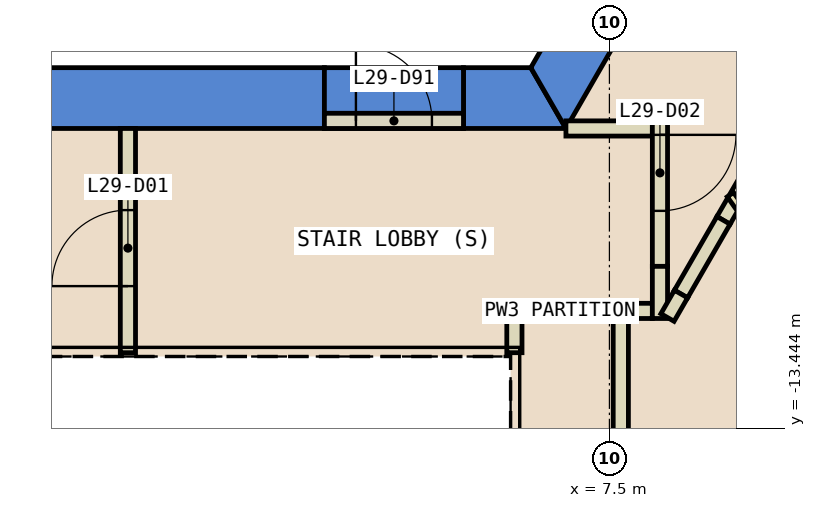
"""IFC4 building model, lengths in metres.
Left out: names, types, materials, properties, quantities, classifications, styles, units other than length and angle.
Written with IfcOpenShell. Run it as: python <this file> out.ifc"""

import sys

from ifc_helpers import new_model, si_unit, direction, frame, frame_2d, origin, place, context, subcontext, project, spatial, polyline, rectangle, outline, extrude, element, fill, save


model = new_model("IFC4")
c1 = context("Model", 3, precision=1e-05, world=origin(), true_north=direction((0.0, 1.0)))
c2 = subcontext(c1, "Body", "Model", "MODEL_VIEW")
j1 = project(units=[si_unit("LENGTHUNIT", "METRE"), si_unit("PLANEANGLEUNIT", "RADIAN")], contexts=[c1])
p1 = place(None, origin())
s1 = spatial("IfcSite", under=j1, at=p1, CompositionType="ELEMENT")
p2 = place(p1, origin())
s2 = spatial("IfcBuilding", under=s1, at=p2, CompositionType="ELEMENT")
p3 = place(p2, frame((0.0, 0.0, 132.8)))
s3 = spatial("IfcBuildingStorey", under=s2, at=p3, CompositionType="ELEMENT", Elevation=132.8)
p4 = place(p3, frame((0.0, 0.0, -0.6)))
e1 = element("IfcWall", 1, at=p4, inside=s3, PredefinedType="SHEAR", context=c2, shape_type="SweptSolid", body=[
    extrude(outline(polyline([(3.75, -9.5), (3.75, -8.7), (-6.466, -8.7), (-6.928, -9.5), (3.75, -9.5)])), origin(), (0.0, 0.0, 1.0), 5.4),
])
p5 = place(p3, frame((0.0, 0.0, -0.6)))
e2 = element("IfcWall", 2, at=p5, inside=s3, PredefinedType="SHEAR", context=c2, shape_type="SweptSolid", body=[
    extrude(outline(polyline([(5.58, -8.7), (5.58, -9.5), (6.928, -9.5), (6.466, -8.7), (5.58, -8.7)])), origin(), (0.0, 0.0, 1.0), 5.4),
])
p6 = place(p3, frame((0.0, 0.0, 3.6)))
e3 = element("IfcWall", 3, at=p6, inside=s3, PredefinedType="SHEAR", context=c2, shape_type="SweptSolid", body=[
    extrude(outline(polyline([(5.58, -9.5), (5.58, -8.7), (3.75, -8.7), (3.75, -9.5), (5.58, -9.5)])), origin(), (0.0, 0.0, 1.0), 1.2),
])
p7 = place(p3, frame((0.0, 0.0, -0.6)))
e4 = element("IfcWall", 4, at=p7, inside=s3, PredefinedType="SHEAR", context=c2, shape_type="SweptSolid", body=[
    extrude(outline(polyline([(8.117, -7.44), (7.424, -7.04), (6.466, -8.7), (6.928, -9.5), (8.117, -7.44)])), origin(), (0.0, 0.0, 1.0), 5.4),
])
p8 = place(p3, frame((9.31, -5.375, 0.0), z_axis=(0.0, 0.0, 1.0), x_axis=(0.86602173752, -0.500006350103, 0.0)))
e5 = element("IfcWall", 5, at=p8, inside=s3, PredefinedType="SHEAR", context=c2, shape_type="SweptSolid", body=[
    extrude(rectangle(XDim=31.463, YDim=1.0, at=frame_2d((15.732, 0.0))), origin(), (0.0, 0.0, 1.0), 4.8),
])
p9 = place(p3, frame((1.165, -12.45, 0.0), z_axis=(0.0, 0.0, 1.0), x_axis=(0.0, 1.0, 0.0)))
e6 = element("IfcWall", 6, at=p9, inside=s3, PredefinedType="PARTITIONING", context=c2, shape_type="SweptSolid", body=[
    extrude(rectangle(XDim=2.95, YDim=0.2, at=frame_2d((1.475, 0.0))), origin(), (0.0, 0.0, 1.0), 4.8),
])
p10 = place(p9, frame((0.876, 0.0, 0.0)))
e7 = element("IfcOpeningElement", 7, at=p10, cuts=e6, PredefinedType="OPENING", context=c2, shape_type="SweptSolid", body=[
    extrude(rectangle(XDim=1.0, YDim=2.1, at=frame_2d((0.5, 1.05))), frame((0.0, 0.11, 0.0), z_axis=(0.0, -1.0, 0.0), x_axis=(1.0, 0.0, 0.0)), (0.0, 0.0, 1.0), 0.22),
])
p11 = place(p3, frame((7.55, -11.9, 0.0), z_axis=(0.0, 0.0, 1.0), x_axis=(-1.0, 0.0, 0.0)))
e8 = element("IfcWall", 8, at=p11, inside=s3, PredefinedType="PARTITIONING", context=c2, shape_type="SweptSolid", body=[
    extrude(rectangle(XDim=1.399, YDim=0.2, at=frame_2d((0.7, 0.0))), origin(), (0.0, 0.0, 1.0), 4.8),
])
p12 = place(p3, frame((6.25, -12.0, 0.0), z_axis=(0.0, 0.0, 1.0), x_axis=(0.0, -1.0, 0.0)))
e9 = element("IfcWall", 9, at=p12, inside=s3, PredefinedType="PARTITIONING", context=c2, shape_type="SweptSolid", body=[
    extrude(rectangle(XDim=0.45, YDim=0.2, at=frame_2d((0.225, 0.0))), origin(), (0.0, 0.0, 1.0), 4.8),
])
p13 = place(p3, frame((6.928, -9.5, 0.0), z_axis=(0.0, 0.0, 1.0), x_axis=(1.0, 0.0, 0.0)))
e10 = element("IfcWall", 10, at=p13, inside=s3, PredefinedType="PARTITIONING", context=c2, shape_type="SweptSolid", body=[
    extrude(rectangle(XDim=1.137, YDim=0.2, at=frame_2d((0.568, 0.0))), origin(), (0.0, 0.0, 1.0), 2.4),
])
p14 = place(p3, frame((8.165, -9.4, 0.0), z_axis=(0.0, 0.0, 1.0), x_axis=(0.0, -1.0, 0.0)))
e11 = element("IfcWall", 11, at=p14, inside=s3, PredefinedType="PARTITIONING", context=c2, shape_type="SweptSolid", body=[
    extrude(rectangle(XDim=1.914, YDim=0.2, at=frame_2d((0.957, 0.0))), origin(), (0.0, 0.0, 1.0), 2.4),
])
p15 = place(p14, frame((0.184, 0.0, 0.0)))
e12 = element("IfcOpeningElement", 12, at=p15, cuts=e11, PredefinedType="OPENING", context=c2, shape_type="SweptSolid", body=[
    extrude(rectangle(XDim=1.0, YDim=2.1, at=frame_2d((0.5, 1.05))), frame((0.0, 0.11, 0.0), z_axis=(0.0, -1.0, 0.0), x_axis=(1.0, 0.0, 0.0)), (0.0, 0.0, 1.0), 0.22),
])
p16 = place(p3, frame((8.065, -11.9, 0.0), z_axis=(0.0, 0.0, 1.0), x_axis=(-1.0, 0.0, 0.0)))
e13 = element("IfcWall", 13, at=p16, inside=s3, PredefinedType="PARTITIONING", context=c2, shape_type="SweptSolid", body=[
    extrude(rectangle(XDim=0.315, YDim=0.2, at=frame_2d((0.157, 0.0))), origin(), (0.0, 0.0, 1.0), 4.8),
])
p17 = place(p3, frame((7.65, -11.8, 0.0), z_axis=(0.0, 0.0, 1.0), x_axis=(0.0, -1.0, 0.0)))
e14 = element("IfcWall", 14, at=p17, inside=s3, PredefinedType="PARTITIONING", context=c2, shape_type="SweptSolid", body=[
    extrude(rectangle(XDim=9.006, YDim=0.2, at=frame_2d((4.503, 0.0))), origin(), (0.0, 0.0, 1.0), 4.8),
])
p18 = place(p17, frame((7.864, 0.0, 0.0)))
e15 = element("IfcOpeningElement", 15, at=p18, cuts=e14, PredefinedType="OPENING", context=c2, shape_type="SweptSolid", body=[
    extrude(rectangle(XDim=1.0, YDim=2.1, at=frame_2d((0.5, 1.05))), frame((0.0, 0.11, 0.0), z_axis=(0.0, -1.0, 0.0), x_axis=(1.0, 0.0, 0.0)), (0.0, 0.0, 1.0), 0.22),
])
p19 = place(p3, frame((9.145, -10.46, 0.0), z_axis=(0.0, 0.0, 1.0), x_axis=(-0.500701704226, -0.865619895442, 0.0)))
e16 = element("IfcWall", 16, at=p19, inside=s3, PredefinedType="PARTITIONING", context=c2, shape_type="SweptSolid", body=[
    extrude(rectangle(XDim=0.288, YDim=0.2, at=frame_2d((0.144, 0.0))), origin(), (0.0, 0.0, 1.0), 4.8),
])
p20 = place(p3, frame((10.89, -7.437, 0.0), z_axis=(0.0, 0.0, 1.0), x_axis=(-0.499905227862, -0.86608011359, 0.0)))
e17 = element("IfcWall", 17, at=p20, inside=s3, PredefinedType="PARTITIONING", context=c2, shape_type="SweptSolid", body=[
    extrude(rectangle(XDim=3.43, YDim=0.2, at=frame_2d((1.715, 0.0))), origin(), (0.0, 0.0, 1.0), 4.8),
])
p21 = place(p20, frame((1.152, 0.0, 0.0)))
e18 = element("IfcOpeningElement", 18, at=p21, cuts=e17, PredefinedType="OPENING", context=c2, shape_type="SweptSolid", body=[
    extrude(rectangle(XDim=1.0, YDim=2.1, at=frame_2d((0.5, 1.05))), frame((0.0, 0.11, 0.0), z_axis=(0.0, -1.0, 0.0), x_axis=(1.0, 0.0, 0.0)), (0.0, 0.0, 1.0), 0.22),
])
p22 = place(p3, frame((9.092, -10.37, 0.0), z_axis=(0.0, 0.0, 1.0), x_axis=(0.577122389033, -0.816657668841, 0.0)))
e19 = element("IfcWall", 19, at=p22, inside=s3, PredefinedType="PARTITIONING", context=c2, shape_type="SweptSolid", body=[
    extrude(rectangle(XDim=20.118, YDim=0.1, at=frame_2d((10.059, 0.0))), origin(), (0.0, 0.0, 1.0), 4.8),
])
p23 = place(p3, frame((3.75, -9.4, 0.0), z_axis=(0.0, 0.0, 1.0), x_axis=(1.0, 0.0, 0.0)))
e20 = element("IfcWall", 20, at=p23, inside=s3, PredefinedType="PARTITIONING", context=c2, shape_type="SweptSolid", body=[
    extrude(rectangle(XDim=1.83, YDim=0.2, at=frame_2d((0.915, 0.0))), origin(), (0.0, 0.0, 1.0), 2.4),
])
p24 = place(p23, frame((0.415, 0.0, 0.0)))
e21 = element("IfcOpeningElement", 21, at=p24, cuts=e20, PredefinedType="OPENING", context=c2, shape_type="SweptSolid", body=[
    extrude(rectangle(XDim=1.0, YDim=2.1, at=frame_2d((0.5, 1.05))), frame((0.0, 0.11, 0.0), z_axis=(0.0, -1.0, 0.0), x_axis=(1.0, 0.0, 0.0)), (0.0, 0.0, 1.0), 0.22),
])
p25 = place(p3, frame((8.165, -11.314, 0.0), z_axis=(0.0, 0.0, 1.0), x_axis=(0.0, -1.0, 0.0)))
e22 = element("IfcWall", 22, at=p25, inside=s3, PredefinedType="PARTITIONING", context=c2, shape_type="SweptSolid", body=[
    extrude(rectangle(XDim=0.686, YDim=0.2, at=frame_2d((0.343, 0.0))), origin(), (0.0, 0.0, 1.0), 4.8),
])
p26 = place(p3, frame((9.001, -10.709, 0.0), z_axis=(0.0, 0.0, 1.0), x_axis=(-0.499753940741, -0.866167419564, 0.0)))
e23 = element("IfcWall", 23, at=p26, inside=s3, PredefinedType="PARTITIONING", context=c2, shape_type="SweptSolid", body=[
    extrude(rectangle(XDim=1.119, YDim=0.2, at=frame_2d((0.559, 0.0))), origin(), (0.0, 0.0, 1.0), 2.4),
])
p27 = place(p3, frame((8.442, -11.678, 0.0), z_axis=(0.0, 0.0, 1.0), x_axis=(-0.499011179969, -0.866595547107, 0.0)))
e24 = element("IfcWall", 24, at=p27, inside=s3, PredefinedType="PARTITIONING", context=c2, shape_type="SweptSolid", body=[
    extrude(rectangle(XDim=0.357, YDim=0.2, at=frame_2d((0.178, 0.0))), origin(), (0.0, 0.0, 1.0), 4.8),
])
p28 = place(p10, origin())
e25 = element("IfcDoor", 25, at=p28, inside=s3, OperationType="SINGLE_SWING_LEFT", PredefinedType="DOOR", context=c2, shape_type="SweptSolid", body=[
    extrude(rectangle(XDim=1.0, YDim=2.1, at=frame_2d((0.5, 1.05))), frame((0.0, 0.025, 0.0), z_axis=(0.0, -1.0, 0.0), x_axis=(1.0, 0.0, 0.0)), (0.0, 0.0, 1.0), 0.05),
])
fill(e7, e25)
p29 = place(p15, origin())
e26 = element("IfcDoor", 26, at=p29, inside=s3, OperationType="SINGLE_SWING_RIGHT", PredefinedType="DOOR", context=c2, shape_type="SweptSolid", body=[
    extrude(rectangle(XDim=1.0, YDim=2.1, at=frame_2d((0.5, 1.05))), frame((0.0, 0.025, 0.0), z_axis=(0.0, -1.0, 0.0), x_axis=(1.0, 0.0, 0.0)), (0.0, 0.0, 1.0), 0.05),
])
fill(e12, e26)
p30 = place(p24, origin())
e27 = element("IfcDoor", 27, at=p30, inside=s3, OperationType="SINGLE_SWING_LEFT", PredefinedType="DOOR", context=c2, shape_type="SweptSolid", body=[
    extrude(rectangle(XDim=1.0, YDim=2.1, at=frame_2d((0.5, 1.05))), frame((0.0, 0.025, 0.0), z_axis=(0.0, -1.0, 0.0), x_axis=(1.0, 0.0, 0.0)), (0.0, 0.0, 1.0), 0.05),
])
fill(e21, e27)
save(model, sys.argv[1])
